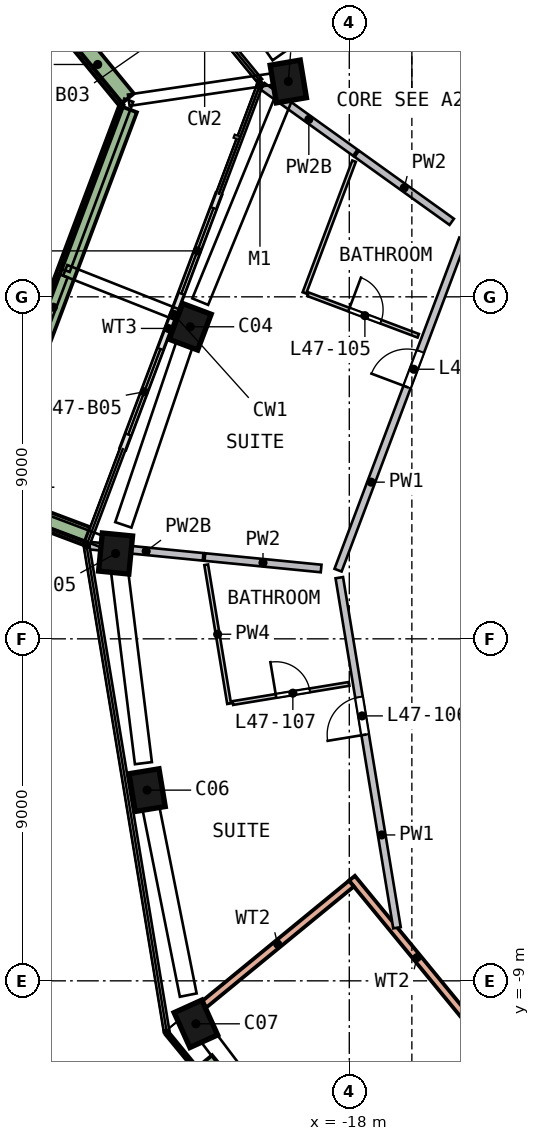
"""IFC4 building model, lengths in metres.
Left out: names, types, materials, properties, quantities, classifications, styles, units other than length and angle.
Written with IfcOpenShell. Run it as: python <this file> out.ifc"""

import sys

from ifc_helpers import new_model, si_unit, direction, frame, frame_2d, origin, origin_2d, place, context, subcontext, project, spatial, rectangle, extrude, element, fill, save


model = new_model("IFC4")
c1 = context("Model", 3, precision=1e-05, world=origin(), true_north=direction((0.0, 1.0)))
c2 = subcontext(c1, "Body", "Model", "MODEL_VIEW")
j1 = project(units=[si_unit("LENGTHUNIT", "METRE"), si_unit("PLANEANGLEUNIT", "RADIAN")], contexts=[c1])
p1 = place(None, origin())
s1 = spatial("IfcSite", under=j1, at=p1, CompositionType="ELEMENT")
p2 = place(p1, origin())
s2 = spatial("IfcBuilding", under=s1, at=p2, CompositionType="ELEMENT")
p3 = place(p2, frame((0.0, 0.0, 194.0)))
s3 = spatial("IfcBuildingStorey", under=s2, at=p3, CompositionType="ELEMENT", Elevation=194.0)
p4 = place(p3, frame((-19.521, 14.78, 0.0), z_axis=(-0.069476843, -0.093421269, 0.993199595), x_axis=(-0.169022074, 0.982313293, 0.080573769)))
e1 = element("IfcColumn", 1, at=p4, inside=s3, PredefinedType="COLUMN", context=c2, shape_type="SweptSolid", body=[
    extrude(rectangle(XDim=1.0, YDim=0.8, at=origin_2d()), origin(), (0.0, 0.0, 1.0), 3.212),
])
p5 = place(p3, frame((-22.14, 8.339, 0.0), z_axis=(-0.038784697, -0.105631262, 0.993648722), x_axis=(-0.350385276, -0.929821941, -0.112522514)))
e2 = element("IfcColumn", 2, at=p5, inside=s3, PredefinedType="COLUMN", context=c2, shape_type="SweptSolid", body=[
    extrude(rectangle(XDim=1.0, YDim=0.8, at=origin_2d()), origin(), (0.0, 0.0, 1.0), 3.21),
])
p6 = place(p3, frame((-24.137, 2.384, 0.0), z_axis=(-0.010339232, -0.114871908, 0.993326505), x_axis=(0.097442208, 0.988536042, 0.115332167)))
e3 = element("IfcColumn", 3, at=p6, inside=s3, PredefinedType="COLUMN", context=c2, shape_type="SweptSolid", body=[
    extrude(rectangle(XDim=1.0, YDim=0.8, at=origin_2d()), origin(), (0.0, 0.0, 1.0), 3.211),
])
p7 = place(p3, frame((-23.343, -3.848, 0.0), z_axis=(0.019240232, -0.110878491, 0.993647711), x_axis=(0.161570885, -0.980424155, -0.112531444)))
e4 = element("IfcColumn", 4, at=p7, inside=s3, PredefinedType="COLUMN", context=c2, shape_type="SweptSolid", body=[
    extrude(rectangle(XDim=1.0, YDim=0.8, at=origin_2d()), origin(), (0.0, 0.0, 1.0), 3.21),
])
p8 = place(p3, frame((-22.095, -10.004, 0.0), z_axis=(0.048502944, -0.104684253, 0.993322038), x_axis=(-0.409920721, 0.904795347, 0.115370627)))
e5 = element("IfcColumn", 5, at=p8, inside=s3, PredefinedType="COLUMN", context=c2, shape_type="SweptSolid", body=[
    extrude(rectangle(XDim=1.0, YDim=0.8, at=origin_2d()), origin(), (0.0, 0.0, 1.0), 3.211),
])
p9 = place(p3, frame((-21.433, 11.706, 0.0), z_axis=(0.0, 0.0, 1.0), x_axis=(-0.35248439, -0.935817693, 0.0)))
e6 = element("IfcWall", 6, at=p9, inside=s3, PredefinedType="SOLIDWALL", context=c2, shape_type="SweptSolid", body=[
    extrude(rectangle(XDim=3.4, YDim=0.15, at=frame_2d((1.7, 0.0))), origin(), (0.0, 0.0, 1.0), 2.475),
])
p10 = place(p9, frame((0.4, 0.0, 0.0)))
e7 = element("IfcOpeningElement", 7, at=p10, cuts=e6, PredefinedType="OPENING", context=c2, shape_type="SweptSolid", body=[
    extrude(rectangle(XDim=2.4, YDim=2.4, at=frame_2d((1.2, 1.2))), frame((0.0, 0.085, 0.0), z_axis=(0.0, -1.0, 0.0), x_axis=(1.0, 0.0, 0.0)), (0.0, 0.0, 1.0), 0.17),
])
p11 = place(p3, frame((-22.631, 8.524, 0.0), z_axis=(0.0, 0.0, 1.0), x_axis=(-0.352524386, -0.935802627, 0.0)))
e8 = element("IfcWall", 8, at=p11, inside=s3, PredefinedType="SOLIDWALL", context=c2, shape_type="SweptSolid", body=[
    extrude(rectangle(XDim=3.761, YDim=0.15, at=frame_2d((1.881, 0.0))), origin(), (0.0, 0.0, 1.0), 2.475),
])
p12 = place(p11, frame((0.961, 0.0, 0.0)))
e9 = element("IfcOpeningElement", 9, at=p12, cuts=e8, PredefinedType="OPENING", context=c2, shape_type="SweptSolid", body=[
    extrude(rectangle(XDim=2.4, YDim=2.4, at=frame_2d((1.2, 1.2))), frame((0.0, 0.085, 0.0), z_axis=(0.0, -1.0, 0.0), x_axis=(1.0, 0.0, 0.0)), (0.0, 0.0, 1.0), 0.17),
])
p13 = place(p3, frame((-25.377, 16.038, 0.0), z_axis=(0.0, 0.0, 1.0), x_axis=(0.634222613, -0.773150488, 0.0)))
e10 = element("IfcWall", 10, at=p13, inside=s3, PredefinedType="SOLIDWALL", context=c2, shape_type="SweptSolid", body=[
    extrude(rectangle(XDim=2.388, YDim=0.5, at=frame_2d((1.194, 0.0))), origin(), (0.0, 0.0, 1.0), 0.7),
])
p14 = place(p3, frame((-23.822, 13.945, 0.0), z_axis=(0.0, 0.0, 1.0), x_axis=(-0.352495325, -0.935813574, 0.0)))
e11 = element("IfcWall", 11, at=p14, inside=s3, PredefinedType="SOLIDWALL", context=c2, shape_type="SweptSolid", body=[
    extrude(rectangle(XDim=11.152, YDim=0.5, at=frame_2d((5.576, 0.0))), origin(), (0.0, 0.0, 1.0), 0.7),
])
p15 = place(p3, frame((-27.431, 3.654, 0.0), z_axis=(0.0, 0.0, 1.0), x_axis=(0.935815205, -0.352490997, 0.0)))
e12 = element("IfcWall", 12, at=p15, inside=s3, PredefinedType="SOLIDWALL", context=c2, shape_type="SweptSolid", body=[
    extrude(rectangle(XDim=2.699, YDim=0.5, at=frame_2d((1.35, 0.0))), origin(), (0.0, 0.0, 1.0), 0.7),
])
p16 = place(p3, frame((-9.685, -16.351, 0.0), z_axis=(0.0, 0.0, 1.0), x_axis=(-0.634198612, 0.773170176, 0.0)))
e13 = element("IfcWall", 13, at=p16, inside=s3, PredefinedType="SOLIDWALL", context=c2, shape_type="SweptSolid", body=[
    extrude(rectangle(XDim=13.0, YDim=0.2, at=frame_2d((6.5, 0.0))), origin(), (0.0, 0.0, 1.0), 3.19),
])
p17 = place(p16, frame((5.6, 0.0, 0.0)))
e14 = element("IfcOpeningElement", 14, at=p17, cuts=e13, PredefinedType="OPENING", context=c2, shape_type="SweptSolid", body=[
    extrude(rectangle(XDim=1.8, YDim=2.4, at=frame_2d((0.9, 1.2))), frame((0.0, 0.11, 0.0), z_axis=(0.0, -1.0, 0.0), x_axis=(1.0, 0.0, 0.0)), (0.0, 0.0, 1.0), 0.22),
])
p18 = place(p3, frame((-21.826, -9.625, 0.0), z_axis=(0.0, 0.0, 1.0), x_axis=(0.773172412, 0.634195886, 0.0)))
e15 = element("IfcWall", 15, at=p18, inside=s3, PredefinedType="SOLIDWALL", context=c2, shape_type="SweptSolid", body=[
    extrude(rectangle(XDim=5.021, YDim=0.2, at=frame_2d((2.51, 0.0))), origin(), (0.0, 0.0, 1.0), 3.19),
])
p19 = place(p3, frame((-22.789, -10.389, 0.0), z_axis=(0.0, 0.0, 1.0), x_axis=(0.63419714, -0.773171383, 0.0)))
e16 = element("IfcWall", 16, at=p19, inside=s3, PredefinedType="SOLIDWALL", context=c2, shape_type="SweptSolid", body=[
    extrude(rectangle(XDim=12.84, YDim=0.1, at=frame_2d((6.42, 0.0))), origin(), (0.0, 0.0, 1.0), 0.7),
])
p20 = place(p3, frame((-21.804, -11.117, 0.0), z_axis=(0.0, 0.0, 1.0), x_axis=(0.63416719, -0.773195949, 0.0)))
e17 = element("IfcWall", 17, at=p20, inside=s3, PredefinedType="SOLIDWALL", context=c2, shape_type="SweptSolid", body=[
    extrude(rectangle(XDim=4.632, YDim=0.5, at=frame_2d((2.316, 0.0))), origin(), (0.0, 0.0, 1.0), 0.7),
])
p21 = place(p3, frame((-16.745, -7.603, 0.0), z_axis=(0.0, 0.0, 1.0), x_axis=(-0.162621987, 0.986688446, 0.0)))
e18 = element("IfcWall", 18, at=p21, inside=s3, PredefinedType="SOLIDWALL", context=c2, shape_type="SweptSolid", body=[
    extrude(rectangle(XDim=9.336, YDim=0.2, at=frame_2d((4.668, 0.0))), origin(), (0.0, 0.0, 1.0), 3.19),
])
p22 = place(p21, frame((5.15, 0.0, 0.0)))
e19 = element("IfcOpeningElement", 19, at=p22, cuts=e18, PredefinedType="OPENING", context=c2, shape_type="SweptSolid", body=[
    extrude(rectangle(XDim=1.0, YDim=2.1, at=frame_2d((0.5, 1.05))), frame((0.0, 0.11, 0.0), z_axis=(0.0, -1.0, 0.0), x_axis=(1.0, 0.0, 0.0)), (0.0, 0.0, 1.0), 0.22),
])
p23 = place(p3, frame((-18.296, 1.807, 0.0), z_axis=(0.0, 0.0, 1.0), x_axis=(0.352510128, 0.935807998, 0.0)))
e20 = element("IfcWall", 20, at=p23, inside=s3, PredefinedType="SOLIDWALL", context=c2, shape_type="SweptSolid", body=[
    extrude(rectangle(XDim=9.317, YDim=0.2, at=frame_2d((4.658, 0.0))), origin(), (0.0, 0.0, 1.0), 3.19),
])
p24 = place(p23, frame((5.15, 0.0, 0.0)))
e21 = element("IfcOpeningElement", 21, at=p24, cuts=e20, PredefinedType="OPENING", context=c2, shape_type="SweptSolid", body=[
    extrude(rectangle(XDim=1.0, YDim=2.1, at=frame_2d((0.5, 1.05))), frame((0.0, 0.11, 0.0), z_axis=(0.0, -1.0, 0.0), x_axis=(1.0, 0.0, 0.0)), (0.0, 0.0, 1.0), 0.22),
])
p25 = place(p3, frame((-21.846, 2.157, 0.0), z_axis=(0.0, 0.0, 1.0), x_axis=(-0.99516083, 0.098259464, 0.0)))
e22 = element("IfcWall", 22, at=p25, inside=s3, PredefinedType="SOLIDWALL", context=c2, shape_type="SweptSolid", body=[
    extrude(rectangle(XDim=3.011, YDim=0.2, at=frame_2d((1.506, 0.0))), origin(), (0.0, 0.0, 1.0), 2.69),
])
p26 = place(p3, frame((-18.741, 1.851, 0.0), z_axis=(0.0, 0.0, 1.0), x_axis=(-0.995164511, 0.098222174, 0.0)))
e23 = element("IfcWall", 23, at=p26, inside=s3, PredefinedType="SOLIDWALL", context=c2, shape_type="SweptSolid", body=[
    extrude(rectangle(XDim=3.075, YDim=0.2, at=frame_2d((1.537, 0.0))), origin(), (0.0, 0.0, 1.0), 3.19),
])
p27 = place(p3, frame((-17.841, 12.792, 0.0), z_axis=(0.0, 0.0, 1.0), x_axis=(-0.812658436, 0.582740307, 0.0)))
e24 = element("IfcWall", 24, at=p27, inside=s3, PredefinedType="SOLIDWALL", context=c2, shape_type="SweptSolid", body=[
    extrude(rectangle(XDim=3.011, YDim=0.2, at=frame_2d((1.506, 0.0))), origin(), (0.0, 0.0, 1.0), 2.69),
])
p28 = place(p3, frame((-12.629, 12.868, 0.0), z_axis=(0.0, 0.0, 1.0), x_axis=(-0.634195474, 0.773172749, 0.0)))
e25 = element("IfcWall", 25, at=p28, inside=s3, PredefinedType="SOLIDWALL", context=c2, shape_type="SweptSolid", body=[
    extrude(rectangle(XDim=14.486, YDim=0.2, at=frame_2d((7.243, 0.0))), origin(), (0.0, 0.0, 1.0), 3.19),
])
p29 = place(p28, frame((4.5, 0.0, 0.0)))
e26 = element("IfcOpeningElement", 26, at=p29, cuts=e25, PredefinedType="OPENING", context=c2, shape_type="SweptSolid", body=[
    extrude(rectangle(XDim=1.0, YDim=2.1, at=frame_2d((0.5, 1.05))), frame((0.0, 0.11, 0.0), z_axis=(0.0, -1.0, 0.0), x_axis=(1.0, 0.0, 0.0)), (0.0, 0.0, 1.0), 0.22),
])
p30 = place(p3, frame((-15.305, 10.973, 0.0), z_axis=(0.0, 0.0, 1.0), x_axis=(-0.812669855, 0.582724383, 0.0)))
e27 = element("IfcWall", 27, at=p30, inside=s3, PredefinedType="SOLIDWALL", context=c2, shape_type="SweptSolid", body=[
    extrude(rectangle(XDim=3.075, YDim=0.2, at=frame_2d((1.537, 0.0))), origin(), (0.0, 0.0, 1.0), 3.19),
])
p31 = place(p3, frame((-19.254, 26.169, 0.0), z_axis=(0.0, 0.0, 1.0), x_axis=(0.63418721, -0.773179528, 0.0)))
e28 = element("IfcWall", 28, at=p31, inside=s3, PredefinedType="SOLIDWALL", context=c2, shape_type="SweptSolid", body=[
    extrude(rectangle(XDim=14.486, YDim=0.2, at=frame_2d((7.243, 0.0))), origin(), (0.0, 0.0, 1.0), 3.19),
])
p32 = place(p31, frame((4.55, 0.0, 0.0)))
e29 = element("IfcOpeningElement", 29, at=p32, cuts=e28, PredefinedType="OPENING", context=c2, shape_type="SweptSolid", body=[
    extrude(rectangle(XDim=1.0, YDim=2.1, at=frame_2d((0.5, 1.05))), frame((0.0, 0.11, 0.0), z_axis=(0.0, -1.0, 0.0), x_axis=(1.0, 0.0, 0.0)), (0.0, 0.0, 1.0), 0.22),
])
p33 = place(p3, frame((-21.163, -1.706, 0.0), z_axis=(0.0, 0.0, 1.0), x_axis=(-0.162603078, 0.986691562, 0.0)))
e30 = element("IfcWall", 30, at=p33, inside=s3, PredefinedType="PARTITIONING", context=c2, shape_type="SweptSolid", body=[
    extrude(rectangle(XDim=3.704, YDim=0.1, at=frame_2d((1.852, 0.0))), origin(), (0.0, 0.0, 1.0), 3.19),
])
p34 = place(p3, frame((-21.064, -1.69, 0.0), z_axis=(0.0, 0.0, 1.0), x_axis=(0.98668818, 0.162623601, 0.0)))
e31 = element("IfcWall", 31, at=p34, inside=s3, PredefinedType="PARTITIONING", context=c2, shape_type="SweptSolid", body=[
    extrude(rectangle(XDim=3.1, YDim=0.1, at=frame_2d((1.55, 0.0))), origin(), (0.0, 0.0, 1.0), 3.19),
])
p35 = place(p34, frame((1.15, 0.0, 0.0)))
e32 = element("IfcOpeningElement", 32, at=p35, cuts=e31, PredefinedType="OPENING", context=c2, shape_type="SweptSolid", body=[
    extrude(rectangle(XDim=0.9, YDim=2.1, at=frame_2d((0.45, 1.05))), frame((0.0, 0.06, 0.0), z_axis=(0.0, -1.0, 0.0), x_axis=(1.0, 0.0, 0.0)), (0.0, 0.0, 1.0), 0.12),
])
p36 = place(p3, frame((-19.18, 9.104, 0.0), z_axis=(0.0, 0.0, 1.0), x_axis=(0.352517215, 0.935805329, 0.0)))
e33 = element("IfcWall", 33, at=p36, inside=s3, PredefinedType="PARTITIONING", context=c2, shape_type="SweptSolid", body=[
    extrude(rectangle(XDim=3.704, YDim=0.1, at=frame_2d((1.852, 0.0))), origin(), (0.0, 0.0, 1.0), 3.19),
])
p37 = place(p3, frame((-19.087, 9.068, 0.0), z_axis=(0.0, 0.0, 1.0), x_axis=(0.935813585, -0.352495296, 0.0)))
e34 = element("IfcWall", 34, at=p37, inside=s3, PredefinedType="PARTITIONING", context=c2, shape_type="SweptSolid", body=[
    extrude(rectangle(XDim=3.1, YDim=0.1, at=frame_2d((1.55, 0.0))), origin(), (0.0, 0.0, 1.0), 3.19),
])
p38 = place(p37, frame((1.15, 0.0, 0.0)))
e35 = element("IfcOpeningElement", 35, at=p38, cuts=e34, PredefinedType="OPENING", context=c2, shape_type="SweptSolid", body=[
    extrude(rectangle(XDim=0.9, YDim=2.1, at=frame_2d((0.45, 1.05))), frame((0.0, 0.06, 0.0), z_axis=(0.0, -1.0, 0.0), x_axis=(1.0, 0.0, 0.0)), (0.0, 0.0, 1.0), 0.12),
])
p39 = place(p10, origin())
e36 = element("IfcDoor", 36, at=p39, inside=s3, OperationType="SLIDING_TO_RIGHT", PredefinedType="DOOR", context=c2, shape_type="SweptSolid", body=[
    extrude(rectangle(XDim=2.4, YDim=2.4, at=frame_2d((1.2, 1.2))), frame((0.0, 0.025, 0.0), z_axis=(0.0, -1.0, 0.0), x_axis=(1.0, 0.0, 0.0)), (0.0, 0.0, 1.0), 0.05),
])
fill(e7, e36)
p40 = place(p12, origin())
e37 = element("IfcDoor", 37, at=p40, inside=s3, OperationType="SLIDING_TO_LEFT", PredefinedType="DOOR", context=c2, shape_type="SweptSolid", body=[
    extrude(rectangle(XDim=2.4, YDim=2.4, at=frame_2d((1.2, 1.2))), frame((0.0, 0.025, 0.0), z_axis=(0.0, -1.0, 0.0), x_axis=(1.0, 0.0, 0.0)), (0.0, 0.0, 1.0), 0.05),
])
fill(e9, e37)
p41 = place(p24, origin())
e38 = element("IfcDoor", 38, at=p41, inside=s3, OperationType="SINGLE_SWING_LEFT", PredefinedType="DOOR", context=c2, shape_type="SweptSolid", body=[
    extrude(rectangle(XDim=1.0, YDim=2.1, at=frame_2d((0.5, 1.05))), frame((0.0, 0.025, 0.0), z_axis=(0.0, -1.0, 0.0), x_axis=(1.0, 0.0, 0.0)), (0.0, 0.0, 1.0), 0.05),
])
fill(e21, e38)
p42 = place(p38, origin())
e39 = element("IfcDoor", 39, at=p42, inside=s3, OperationType="SINGLE_SWING_LEFT", PredefinedType="DOOR", context=c2, shape_type="SweptSolid", body=[
    extrude(rectangle(XDim=0.9, YDim=2.1, at=frame_2d((0.45, 1.05))), frame((0.0, 0.025, 0.0), z_axis=(0.0, -1.0, 0.0), x_axis=(1.0, 0.0, 0.0)), (0.0, 0.0, 1.0), 0.05),
])
fill(e35, e39)
p43 = place(p22, origin())
e40 = element("IfcDoor", 40, at=p43, inside=s3, OperationType="SINGLE_SWING_LEFT", PredefinedType="DOOR", context=c2, shape_type="SweptSolid", body=[
    extrude(rectangle(XDim=1.0, YDim=2.1, at=frame_2d((0.5, 1.05))), frame((0.0, 0.025, 0.0), z_axis=(0.0, -1.0, 0.0), x_axis=(1.0, 0.0, 0.0)), (0.0, 0.0, 1.0), 0.05),
])
fill(e19, e40)
p44 = place(p35, origin())
e41 = element("IfcDoor", 41, at=p44, inside=s3, OperationType="SINGLE_SWING_LEFT", PredefinedType="DOOR", context=c2, shape_type="SweptSolid", body=[
    extrude(rectangle(XDim=0.9, YDim=2.1, at=frame_2d((0.45, 1.05))), frame((0.0, 0.025, 0.0), z_axis=(0.0, -1.0, 0.0), x_axis=(1.0, 0.0, 0.0)), (0.0, 0.0, 1.0), 0.05),
])
fill(e32, e41)
save(model, sys.argv[1])
